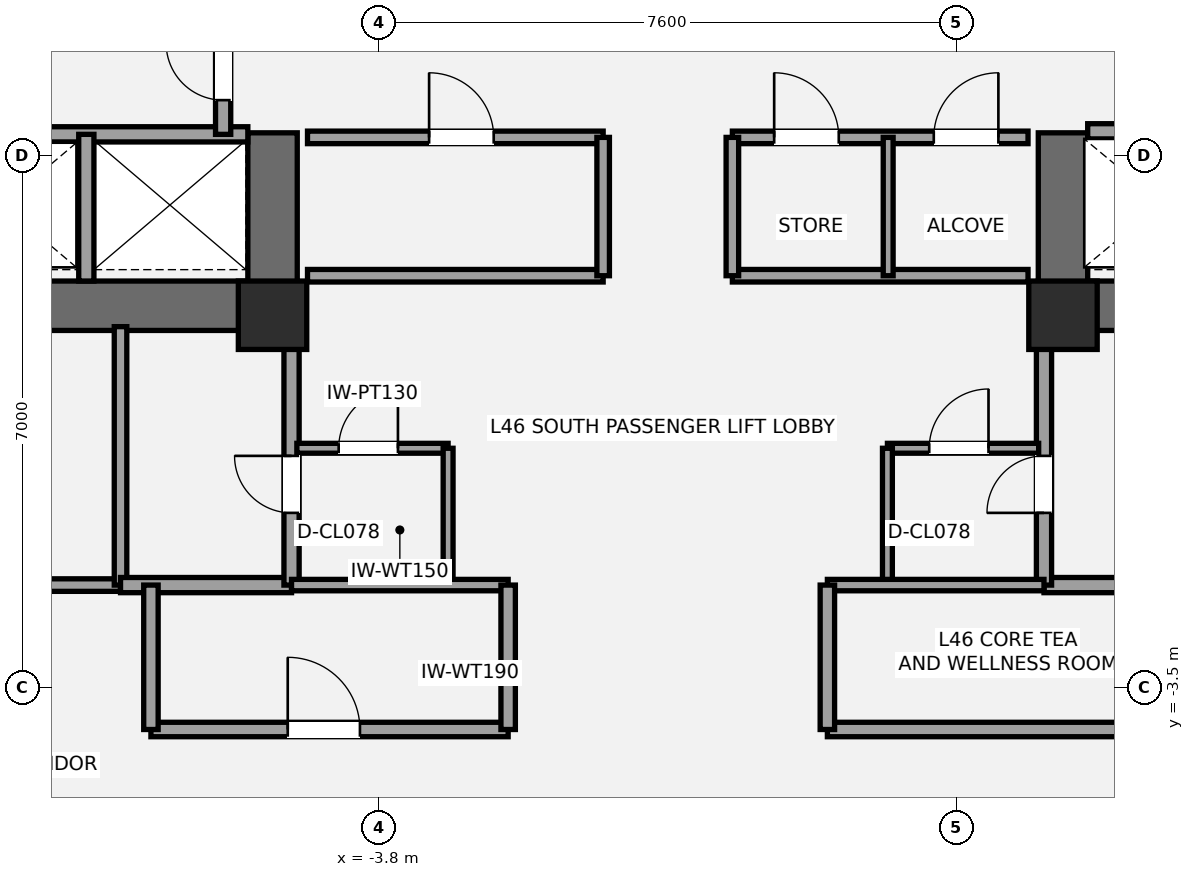
"""IFC4 building model, lengths in metres.
Left out: names, types, materials, properties, quantities, classifications, styles, units other than length and angle.
Written with IfcOpenShell. Run it as: python <this file> out.ifc"""

import sys

from ifc_helpers import new_model, si_unit, direction, frame, frame_2d, origin, origin_2d, place, context, subcontext, project, spatial, rectangle, extrude, element, fill, save


model = new_model("IFC4")
c1 = context("Model", 3, precision=1e-05, world=origin(), true_north=direction((0.0, 1.0)))
c2 = subcontext(c1, "Body", "Model", "MODEL_VIEW")
j1 = project(units=[si_unit("LENGTHUNIT", "METRE"), si_unit("PLANEANGLEUNIT", "RADIAN")], contexts=[c1])
p1 = place(None, origin())
s1 = spatial("IfcSite", under=j1, at=p1, CompositionType="ELEMENT")
p2 = place(p1, origin())
s2 = spatial("IfcBuilding", under=s1, at=p2, CompositionType="ELEMENT")
p3 = place(p2, frame((0.0, 0.0, 169.4)))
s3 = spatial("IfcBuildingStorey", under=s2, at=p3, CompositionType="ELEMENT", Elevation=169.4)
p4 = place(p3, frame((-4.875, 1.525, 0.0), z_axis=(0.0, 0.0, 1.0), x_axis=(-1.0, 0.0, 0.0)))
e1 = element("IfcWall", 1, at=p4, inside=s3, PredefinedType="SHEAR", context=c2, shape_type="SweptSolid", body=[
    extrude(rectangle(XDim=8.925, YDim=0.65, at=frame_2d((4.462, 0.0))), origin(), (0.0, 0.0, 1.0), 3.2),
])
p5 = place(p4, frame((5.425, 0.0, 0.0)))
e2 = element("IfcOpeningElement", 2, at=p5, cuts=e1, PredefinedType="OPENING", context=c2, shape_type="SweptSolid", body=[
    extrude(rectangle(XDim=1.05, YDim=2.15, at=frame_2d((0.525, 1.075))), frame((0.0, 0.335, 0.0), z_axis=(0.0, -1.0, 0.0), x_axis=(1.0, 0.0, 0.0)), (0.0, 0.0, 1.0), 0.67),
])
p6 = place(p4, frame((3.755, 0.0, 0.0)))
e3 = element("IfcOpeningElement", 3, at=p6, cuts=e1, PredefinedType="OPENING", context=c2, shape_type="SweptSolid", body=[
    extrude(rectangle(XDim=1.1, YDim=2.2, at=frame_2d((0.55, 1.1))), frame((0.0, 0.335, 0.0), z_axis=(0.0, -1.0, 0.0), x_axis=(1.0, 0.0, 0.0)), (0.0, 0.0, 1.0), 0.67),
])
p7 = place(p3, frame((-5.2, 1.2, 0.0), z_axis=(0.0, 0.0, 1.0), x_axis=(0.0, 1.0, 0.0)))
e4 = element("IfcWall", 4, at=p7, inside=s3, PredefinedType="SHEAR", context=c2, shape_type="SweptSolid", body=[
    extrude(rectangle(XDim=2.6, YDim=0.65, at=frame_2d((1.3, 0.0))), origin(), (0.0, 0.0, 1.0), 3.2),
])
p8 = place(p3, frame((13.8, 1.525, 0.0), z_axis=(0.0, 0.0, 1.0), x_axis=(-1.0, 0.0, 0.0)))
e5 = element("IfcWall", 5, at=p8, inside=s3, PredefinedType="SHEAR", context=c2, shape_type="SweptSolid", body=[
    extrude(rectangle(XDim=8.925, YDim=0.65, at=frame_2d((4.462, 0.0))), origin(), (0.0, 0.0, 1.0), 3.2),
])
p9 = place(p8, frame((2.45, 0.0, 0.0)))
e6 = element("IfcOpeningElement", 6, at=p9, cuts=e5, PredefinedType="OPENING", context=c2, shape_type="SweptSolid", body=[
    extrude(rectangle(XDim=1.05, YDim=2.15, at=frame_2d((0.525, 1.075))), frame((0.0, 0.335, 0.0), z_axis=(0.0, -1.0, 0.0), x_axis=(1.0, 0.0, 0.0)), (0.0, 0.0, 1.0), 0.67),
])
p10 = place(p8, frame((4.45, 0.0, 0.0)))
e7 = element("IfcOpeningElement", 7, at=p10, cuts=e5, PredefinedType="OPENING", context=c2, shape_type="SweptSolid", body=[
    extrude(rectangle(XDim=1.1, YDim=2.2, at=frame_2d((0.55, 1.1))), frame((0.0, 0.335, 0.0), z_axis=(0.0, -1.0, 0.0), x_axis=(1.0, 0.0, 0.0)), (0.0, 0.0, 1.0), 0.67),
])
p11 = place(p3, frame((5.2, 1.2, 0.0), z_axis=(0.0, 0.0, 1.0), x_axis=(0.0, 1.0, 0.0)))
e8 = element("IfcWall", 8, at=p11, inside=s3, PredefinedType="SHEAR", context=c2, shape_type="SweptSolid", body=[
    extrude(rectangle(XDim=2.6, YDim=0.65, at=frame_2d((1.3, 0.0))), origin(), (0.0, 0.0, 1.0), 3.2),
])
for number, where, z_axis, x_axis in (
    (9, (-5.2, 1.4, 0.0), (0.0, 0.0, 1.0), (1.0, 0.0, 0.0)),
    (10, (5.2, 1.4, 0.0), (0.0, 0.0, 1.0), (1.0, 0.0, 0.0)),
):
    element("IfcColumn", number, at=place(p3, frame(where, z_axis=z_axis, x_axis=x_axis)), inside=s3, PredefinedType="COLUMN", context=c2, shape_type="SweptSolid", body=[
        extrude(rectangle(XDim=0.9, YDim=0.9, at=origin_2d()), origin(), (0.0, 0.0, 1.0), 3.2),
    ])
p12 = place(p3, frame((-13.45, -2.15, 0.0), z_axis=(0.0, 0.0, 1.0), x_axis=(1.0, 0.0, 0.0)))
e11 = element("IfcWall", 11, at=p12, inside=s3, PredefinedType="PARTITIONING", context=c2, shape_type="SweptSolid", body=[
    extrude(rectangle(XDim=6.25, YDim=0.165, at=frame_2d((3.125, 0.0))), origin(), (0.0, 0.0, 1.0), 2.473),
])
p13 = place(p3, frame((-7.2, -2.15, 0.0), z_axis=(0.0, 0.0, 1.0), x_axis=(0.0, 1.0, 0.0)))
e12 = element("IfcWall", 12, at=p13, inside=s3, PredefinedType="PARTITIONING", context=c2, shape_type="SweptSolid", body=[
    extrude(rectangle(XDim=3.4, YDim=0.165, at=frame_2d((1.7, 0.0))), origin(), (0.0, 0.0, 1.0), 2.473),
])
p14 = place(p3, frame((-7.2, -2.15, 0.0), z_axis=(0.0, 0.0, 1.0), x_axis=(1.0, 0.0, 0.0)))
e13 = element("IfcWall", 13, at=p14, inside=s3, PredefinedType="SOLIDWALL", context=c2, shape_type="SweptSolid", body=[
    extrude(rectangle(XDim=2.25, YDim=0.2, at=frame_2d((1.125, 0.0))), origin(), (0.0, 0.0, 1.0), 3.02),
])
p15 = place(p3, frame((-4.95, -2.15, 0.0), z_axis=(0.0, 0.0, 1.0), x_axis=(0.0, 1.0, 0.0)))
e14 = element("IfcWall", 14, at=p15, inside=s3, PredefinedType="SOLIDWALL", context=c2, shape_type="SweptSolid", body=[
    extrude(rectangle(XDim=3.4, YDim=0.2, at=frame_2d((1.7, 0.0))), origin(), (0.0, 0.0, 1.0), 2.473),
])
p16 = place(p15, frame((0.95, 0.0, 0.0)))
e15 = element("IfcOpeningElement", 15, at=p16, cuts=e14, PredefinedType="OPENING", context=c2, shape_type="SweptSolid", body=[
    extrude(rectangle(XDim=0.75, YDim=2.1, at=frame_2d((0.375, 1.05))), frame((0.0, 0.11, 0.0), z_axis=(0.0, -1.0, 0.0), x_axis=(1.0, 0.0, 0.0)), (0.0, 0.0, 1.0), 0.22),
])
p17 = place(p3, frame((4.95, -2.15, 0.0), z_axis=(0.0, 0.0, 1.0), x_axis=(1.0, 0.0, 0.0)))
e16 = element("IfcWall", 16, at=p17, inside=s3, PredefinedType="SOLIDWALL", context=c2, shape_type="SweptSolid", body=[
    extrude(rectangle(XDim=2.25, YDim=0.2, at=frame_2d((1.125, 0.0))), origin(), (0.0, 0.0, 1.0), 3.02),
])
p18 = place(p3, frame((4.95, -2.15, 0.0), z_axis=(0.0, 0.0, 1.0), x_axis=(0.0, 1.0, 0.0)))
e17 = element("IfcWall", 17, at=p18, inside=s3, PredefinedType="SOLIDWALL", context=c2, shape_type="SweptSolid", body=[
    extrude(rectangle(XDim=3.4, YDim=0.2, at=frame_2d((1.7, 0.0))), origin(), (0.0, 0.0, 1.0), 2.473),
])
p19 = place(p18, frame((0.95, 0.0, 0.0)))
e18 = element("IfcOpeningElement", 18, at=p19, cuts=e17, PredefinedType="OPENING", context=c2, shape_type="SweptSolid", body=[
    extrude(rectangle(XDim=0.75, YDim=2.1, at=frame_2d((0.375, 1.05))), frame((0.0, 0.11, 0.0), z_axis=(0.0, -1.0, 0.0), x_axis=(1.0, 0.0, 0.0)), (0.0, 0.0, 1.0), 0.22),
])
p20 = place(p3, frame((-4.88, -0.35, 0.0), z_axis=(0.0, 0.0, 1.0), x_axis=(1.0, 0.0, 0.0)))
e19 = element("IfcWall", 19, at=p20, inside=s3, PredefinedType="PARTITIONING", context=c2, shape_type="SweptSolid", body=[
    extrude(rectangle(XDim=1.99, YDim=0.13, at=frame_2d((0.995, 0.0))), origin(), (0.0, 0.0, 1.0), 3.02),
])
p21 = place(p20, frame((0.55, 0.0, 0.0)))
e20 = element("IfcOpeningElement", 20, at=p21, cuts=e19, PredefinedType="OPENING", context=c2, shape_type="SweptSolid", body=[
    extrude(rectangle(XDim=0.78, YDim=2.1, at=frame_2d((0.39, 1.05))), frame((0.0, 0.075, 0.0), z_axis=(0.0, -1.0, 0.0), x_axis=(1.0, 0.0, 0.0)), (0.0, 0.0, 1.0), 0.15),
])
p22 = place(p3, frame((-2.89, -2.15, 0.0), z_axis=(0.0, 0.0, 1.0), x_axis=(0.0, 1.0, 0.0)))
e21 = element("IfcWall", 21, at=p22, inside=s3, PredefinedType="PARTITIONING", context=c2, shape_type="SweptSolid", body=[
    extrude(rectangle(XDim=1.8, YDim=0.13, at=frame_2d((0.9, 0.0))), origin(), (0.0, 0.0, 1.0), 3.02),
])
p23 = place(p3, frame((2.89, -0.35, 0.0), z_axis=(0.0, 0.0, 1.0), x_axis=(1.0, 0.0, 0.0)))
e22 = element("IfcWall", 22, at=p23, inside=s3, PredefinedType="PARTITIONING", context=c2, shape_type="SweptSolid", body=[
    extrude(rectangle(XDim=1.99, YDim=0.13, at=frame_2d((0.995, 0.0))), origin(), (0.0, 0.0, 1.0), 3.02),
])
p24 = place(p23, frame((0.55, 0.0, 0.0)))
e23 = element("IfcOpeningElement", 23, at=p24, cuts=e22, PredefinedType="OPENING", context=c2, shape_type="SweptSolid", body=[
    extrude(rectangle(XDim=0.78, YDim=2.1, at=frame_2d((0.39, 1.05))), frame((0.0, 0.075, 0.0), z_axis=(0.0, -1.0, 0.0), x_axis=(1.0, 0.0, 0.0)), (0.0, 0.0, 1.0), 0.15),
])
p25 = place(p3, frame((2.89, -2.15, 0.0), z_axis=(0.0, 0.0, 1.0), x_axis=(0.0, 1.0, 0.0)))
e24 = element("IfcWall", 24, at=p25, inside=s3, PredefinedType="PARTITIONING", context=c2, shape_type="SweptSolid", body=[
    extrude(rectangle(XDim=1.8, YDim=0.13, at=frame_2d((0.9, 0.0))), origin(), (0.0, 0.0, 1.0), 3.02),
])
p26 = place(p3, frame((-9.78, 3.78, 0.0), z_axis=(0.0, 0.0, 1.0), x_axis=(1.0, 0.0, 0.0)))
e25 = element("IfcWall", 25, at=p26, inside=s3, PredefinedType="SOLIDWALL", context=c2, shape_type="SweptSolid", body=[
    extrude(rectangle(XDim=4.255, YDim=0.2, at=frame_2d((2.127, 0.0))), origin(), (0.0, 0.0, 1.0), 3.02),
])
p27 = place(p3, frame((-7.65, 1.85, 0.0), z_axis=(0.0, 0.0, 1.0), x_axis=(0.0, 1.0, 0.0)))
e26 = element("IfcWall", 26, at=p27, inside=s3, PredefinedType="SOLIDWALL", context=c2, shape_type="SweptSolid", body=[
    extrude(rectangle(XDim=1.93, YDim=0.2, at=frame_2d((0.965, 0.0))), origin(), (0.0, 0.0, 1.0), 3.02),
])
p28 = place(p3, frame((-5.85, 3.78, 0.0), z_axis=(0.0, 0.0, 1.0), x_axis=(0.0, 1.0, 0.0)))
e27 = element("IfcWall", 27, at=p28, inside=s3, PredefinedType="SOLIDWALL", context=c2, shape_type="SweptSolid", body=[
    extrude(rectangle(XDim=1.69, YDim=0.2, at=frame_2d((0.845, 0.0))), origin(), (0.0, 0.0, 1.0), 3.02),
])
p29 = place(p28, frame((0.45, 0.0, 0.0)))
e28 = element("IfcOpeningElement", 28, at=p29, cuts=e27, PredefinedType="OPENING", context=c2, shape_type="SweptSolid", body=[
    extrude(rectangle(XDim=0.75, YDim=2.1, at=frame_2d((0.375, 1.05))), frame((0.0, 0.11, 0.0), z_axis=(0.0, -1.0, 0.0), x_axis=(1.0, 0.0, 0.0)), (0.0, 0.0, 1.0), 0.22),
])
p30 = place(p3, frame((5.525, 3.82, 0.0), z_axis=(0.0, 0.0, 1.0), x_axis=(1.0, 0.0, 0.0)))
e29 = element("IfcWall", 29, at=p30, inside=s3, PredefinedType="SOLIDWALL", context=c2, shape_type="SweptSolid", body=[
    extrude(rectangle(XDim=4.255, YDim=0.2, at=frame_2d((2.127, 0.0))), origin(), (0.0, 0.0, 1.0), 3.02),
])
p31 = place(p30, frame((0.65, 0.0, 0.0)))
e30 = element("IfcOpeningElement", 30, at=p31, cuts=e29, PredefinedType="OPENING", context=c2, shape_type="SweptSolid", body=[
    extrude(rectangle(XDim=1.2, YDim=2.2, at=frame_2d((0.6, 1.1))), frame((0.0, 0.11, 0.0), z_axis=(0.0, -1.0, 0.0), x_axis=(1.0, 0.0, 0.0)), (0.0, 0.0, 1.0), 0.22),
])
p32 = place(p3, frame((-4.74, 1.92, 0.0), z_axis=(0.0, 0.0, 1.0), x_axis=(1.0, 0.0, 0.0)))
e31 = element("IfcWall", 31, at=p32, inside=s3, PredefinedType="PARTITIONING", context=c2, shape_type="SweptSolid", body=[
    extrude(rectangle(XDim=3.89, YDim=0.165, at=frame_2d((1.945, 0.0))), origin(), (0.0, 0.0, 1.0), 2.16),
])
p33 = place(p3, frame((-4.74, 3.74, 0.0), z_axis=(0.0, 0.0, 1.0), x_axis=(1.0, 0.0, 0.0)))
e32 = element("IfcWall", 32, at=p33, inside=s3, PredefinedType="PARTITIONING", context=c2, shape_type="SweptSolid", body=[
    extrude(rectangle(XDim=3.89, YDim=0.165, at=frame_2d((1.945, 0.0))), origin(), (0.0, 0.0, 1.0), 3.02),
])
p34 = place(p33, frame((1.6, 0.0, 0.0)))
e33 = element("IfcOpeningElement", 33, at=p34, cuts=e32, PredefinedType="OPENING", context=c2, shape_type="SweptSolid", body=[
    extrude(rectangle(XDim=0.85, YDim=2.1, at=frame_2d((0.425, 1.05))), frame((0.0, 0.093, 0.0), z_axis=(0.0, -1.0, 0.0), x_axis=(1.0, 0.0, 0.0)), (0.0, 0.0, 1.0), 0.185),
])
p35 = place(p3, frame((-0.85, 1.92, 0.0), z_axis=(0.0, 0.0, 1.0), x_axis=(0.0, 1.0, 0.0)))
e34 = element("IfcWall", 34, at=p35, inside=s3, PredefinedType="PARTITIONING", context=c2, shape_type="SweptSolid", body=[
    extrude(rectangle(XDim=1.82, YDim=0.165, at=frame_2d((0.91, 0.0))), origin(), (0.0, 0.0, 1.0), 3.02),
])
p36 = place(p3, frame((0.85, 1.92, 0.0), z_axis=(0.0, 0.0, 1.0), x_axis=(1.0, 0.0, 0.0)))
e35 = element("IfcWall", 35, at=p36, inside=s3, PredefinedType="PARTITIONING", context=c2, shape_type="SweptSolid", body=[
    extrude(rectangle(XDim=3.89, YDim=0.165, at=frame_2d((1.945, 0.0))), origin(), (0.0, 0.0, 1.0), 2.16),
])
p37 = place(p3, frame((0.85, 3.74, 0.0), z_axis=(0.0, 0.0, 1.0), x_axis=(1.0, 0.0, 0.0)))
e36 = element("IfcWall", 36, at=p37, inside=s3, PredefinedType="PARTITIONING", context=c2, shape_type="SweptSolid", body=[
    extrude(rectangle(XDim=3.89, YDim=0.165, at=frame_2d((1.945, 0.0))), origin(), (0.0, 0.0, 1.0), 3.02),
])
p38 = place(p37, frame((0.55, 0.0, 0.0)))
e37 = element("IfcOpeningElement", 37, at=p38, cuts=e36, PredefinedType="OPENING", context=c2, shape_type="SweptSolid", body=[
    extrude(rectangle(XDim=0.85, YDim=2.1, at=frame_2d((0.425, 1.05))), frame((0.0, 0.093, 0.0), z_axis=(0.0, -1.0, 0.0), x_axis=(1.0, 0.0, 0.0)), (0.0, 0.0, 1.0), 0.185),
])
p39 = place(p37, frame((2.65, 0.0, 0.0)))
e38 = element("IfcOpeningElement", 38, at=p39, cuts=e36, PredefinedType="OPENING", context=c2, shape_type="SweptSolid", body=[
    extrude(rectangle(XDim=0.85, YDim=2.1, at=frame_2d((0.425, 1.05))), frame((0.0, 0.093, 0.0), z_axis=(0.0, -1.0, 0.0), x_axis=(1.0, 0.0, 0.0)), (0.0, 0.0, 1.0), 0.185),
])
p40 = place(p3, frame((0.85, 1.92, 0.0), z_axis=(0.0, 0.0, 1.0), x_axis=(0.0, 1.0, 0.0)))
e39 = element("IfcWall", 39, at=p40, inside=s3, PredefinedType="PARTITIONING", context=c2, shape_type="SweptSolid", body=[
    extrude(rectangle(XDim=1.82, YDim=0.165, at=frame_2d((0.91, 0.0))), origin(), (0.0, 0.0, 1.0), 3.02),
])
p41 = place(p3, frame((2.9, 1.92, 0.0), z_axis=(0.0, 0.0, 1.0), x_axis=(0.0, 1.0, 0.0)))
e40 = element("IfcWall", 40, at=p41, inside=s3, PredefinedType="PARTITIONING", context=c2, shape_type="SweptSolid", body=[
    extrude(rectangle(XDim=1.82, YDim=0.13, at=frame_2d((0.91, 0.0))), origin(), (0.0, 0.0, 1.0), 3.02),
])
p42 = place(p3, frame((-6.8, -4.05, 0.0), z_axis=(0.0, 0.0, 1.0), x_axis=(1.0, 0.0, 0.0)))
e41 = element("IfcWall", 41, at=p42, inside=s3, PredefinedType="PLUMBINGWALL", context=c2, shape_type="SweptSolid", body=[
    extrude(rectangle(XDim=4.7, YDim=0.19, at=frame_2d((2.35, 0.0))), origin(), (0.0, 0.0, 1.0), 3.02),
])
p43 = place(p42, frame((1.8, 0.0, 0.0)))
e42 = element("IfcOpeningElement", 42, at=p43, cuts=e41, PredefinedType="OPENING", context=c2, shape_type="SweptSolid", body=[
    extrude(rectangle(XDim=0.95, YDim=2.15, at=frame_2d((0.475, 1.075))), frame((0.0, 0.105, 0.0), z_axis=(0.0, -1.0, 0.0), x_axis=(1.0, 0.0, 0.0)), (0.0, 0.0, 1.0), 0.21),
])
p44 = place(p3, frame((-4.95, -2.15, 0.0), z_axis=(0.0, 0.0, 1.0), x_axis=(1.0, 0.0, 0.0)))
e43 = element("IfcWall", 43, at=p44, inside=s3, PredefinedType="PLUMBINGWALL", context=c2, shape_type="SweptSolid", body=[
    extrude(rectangle(XDim=2.85, YDim=0.15, at=frame_2d((1.425, 0.0))), origin(), (0.0, 0.0, 1.0), 3.02),
])
p45 = place(p3, frame((-6.8, -4.05, 0.0), z_axis=(0.0, 0.0, 1.0), x_axis=(0.0, 1.0, 0.0)))
e44 = element("IfcWall", 44, at=p45, inside=s3, PredefinedType="PLUMBINGWALL", context=c2, shape_type="SweptSolid", body=[
    extrude(rectangle(XDim=1.9, YDim=0.19, at=frame_2d((0.95, 0.0))), origin(), (0.0, 0.0, 1.0), 2.473),
])
p46 = place(p3, frame((-2.1, -4.05, 0.0), z_axis=(0.0, 0.0, 1.0), x_axis=(0.0, 1.0, 0.0)))
e45 = element("IfcWall", 45, at=p46, inside=s3, PredefinedType="PLUMBINGWALL", context=c2, shape_type="SweptSolid", body=[
    extrude(rectangle(XDim=1.9, YDim=0.19, at=frame_2d((0.95, 0.0))), origin(), (0.0, 0.0, 1.0), 3.02),
])
p47 = place(p3, frame((2.1, -4.05, 0.0), z_axis=(0.0, 0.0, 1.0), x_axis=(1.0, 0.0, 0.0)))
e46 = element("IfcWall", 46, at=p47, inside=s3, PredefinedType="PLUMBINGWALL", context=c2, shape_type="SweptSolid", body=[
    extrude(rectangle(XDim=11.35, YDim=0.19, at=frame_2d((5.675, 0.0))), origin(), (0.0, 0.0, 1.0), 3.02),
])
p48 = place(p47, frame((5.2, 0.0, 0.0)))
e47 = element("IfcOpeningElement", 47, at=p48, cuts=e46, PredefinedType="OPENING", context=c2, shape_type="SweptSolid", body=[
    extrude(rectangle(XDim=0.9, YDim=2.1, at=frame_2d((0.45, 1.05))), frame((0.0, 0.105, 0.0), z_axis=(0.0, -1.0, 0.0), x_axis=(1.0, 0.0, 0.0)), (0.0, 0.0, 1.0), 0.21),
])
p49 = place(p3, frame((2.1, -2.15, 0.0), z_axis=(0.0, 0.0, 1.0), x_axis=(1.0, 0.0, 0.0)))
e48 = element("IfcWall", 48, at=p49, inside=s3, PredefinedType="PLUMBINGWALL", context=c2, shape_type="SweptSolid", body=[
    extrude(rectangle(XDim=2.85, YDim=0.15, at=frame_2d((1.425, 0.0))), origin(), (0.0, 0.0, 1.0), 3.02),
])
p50 = place(p3, frame((2.1, -4.05, 0.0), z_axis=(0.0, 0.0, 1.0), x_axis=(0.0, 1.0, 0.0)))
e49 = element("IfcWall", 49, at=p50, inside=s3, PredefinedType="PLUMBINGWALL", context=c2, shape_type="SweptSolid", body=[
    extrude(rectangle(XDim=1.9, YDim=0.19, at=frame_2d((0.95, 0.0))), origin(), (0.0, 0.0, 1.0), 3.02),
])
p51 = place(p16, origin())
e50 = element("IfcDoor", 50, at=p51, inside=s3, OperationType="SINGLE_SWING_RIGHT", PredefinedType="DOOR", context=c2, shape_type="SweptSolid", body=[
    extrude(rectangle(XDim=0.75, YDim=2.1, at=frame_2d((0.375, 1.05))), frame((0.0, 0.025, 0.0), z_axis=(0.0, -1.0, 0.0), x_axis=(1.0, 0.0, 0.0)), (0.0, 0.0, 1.0), 0.05),
])
fill(e15, e50)
p52 = place(p19, origin())
e51 = element("IfcDoor", 51, at=p52, inside=s3, OperationType="SINGLE_SWING_LEFT", PredefinedType="DOOR", context=c2, shape_type="SweptSolid", body=[
    extrude(rectangle(XDim=0.75, YDim=2.1, at=frame_2d((0.375, 1.05))), frame((0.0, 0.025, 0.0), z_axis=(0.0, -1.0, 0.0), x_axis=(1.0, 0.0, 0.0)), (0.0, 0.0, 1.0), 0.05),
])
fill(e18, e51)
p53 = place(p21, origin())
e52 = element("IfcDoor", 52, at=p53, inside=s3, OperationType="SINGLE_SWING_RIGHT", PredefinedType="DOOR", context=c2, shape_type="SweptSolid", body=[
    extrude(rectangle(XDim=0.78, YDim=2.1, at=frame_2d((0.39, 1.05))), frame((0.0, 0.025, 0.0), z_axis=(0.0, -1.0, 0.0), x_axis=(1.0, 0.0, 0.0)), (0.0, 0.0, 1.0), 0.05),
])
fill(e20, e52)
p54 = place(p24, origin())
e53 = element("IfcDoor", 53, at=p54, inside=s3, OperationType="SINGLE_SWING_RIGHT", PredefinedType="DOOR", context=c2, shape_type="SweptSolid", body=[
    extrude(rectangle(XDim=0.78, YDim=2.1, at=frame_2d((0.39, 1.05))), frame((0.0, 0.025, 0.0), z_axis=(0.0, -1.0, 0.0), x_axis=(1.0, 0.0, 0.0)), (0.0, 0.0, 1.0), 0.05),
])
fill(e23, e53)
p55 = place(p29, origin())
e54 = element("IfcDoor", 54, at=p55, inside=s3, OperationType="SINGLE_SWING_RIGHT", PredefinedType="DOOR", context=c2, shape_type="SweptSolid", body=[
    extrude(rectangle(XDim=0.75, YDim=2.1, at=frame_2d((0.375, 1.05))), frame((0.0, 0.025, 0.0), z_axis=(0.0, -1.0, 0.0), x_axis=(1.0, 0.0, 0.0)), (0.0, 0.0, 1.0), 0.05),
])
fill(e28, e54)
p56 = place(p34, origin())
e55 = element("IfcDoor", 55, at=p56, inside=s3, OperationType="SINGLE_SWING_LEFT", PredefinedType="DOOR", context=c2, shape_type="SweptSolid", body=[
    extrude(rectangle(XDim=0.85, YDim=2.1, at=frame_2d((0.425, 1.05))), frame((0.0, 0.025, 0.0), z_axis=(0.0, -1.0, 0.0), x_axis=(1.0, 0.0, 0.0)), (0.0, 0.0, 1.0), 0.05),
])
fill(e33, e55)
p57 = place(p38, origin())
e56 = element("IfcDoor", 56, at=p57, inside=s3, OperationType="SINGLE_SWING_LEFT", PredefinedType="DOOR", context=c2, shape_type="SweptSolid", body=[
    extrude(rectangle(XDim=0.85, YDim=2.1, at=frame_2d((0.425, 1.05))), frame((0.0, 0.025, 0.0), z_axis=(0.0, -1.0, 0.0), x_axis=(1.0, 0.0, 0.0)), (0.0, 0.0, 1.0), 0.05),
])
fill(e37, e56)
p58 = place(p39, origin())
e57 = element("IfcDoor", 57, at=p58, inside=s3, OperationType="SINGLE_SWING_RIGHT", PredefinedType="DOOR", context=c2, shape_type="SweptSolid", body=[
    extrude(rectangle(XDim=0.85, YDim=2.1, at=frame_2d((0.425, 1.05))), frame((0.0, 0.025, 0.0), z_axis=(0.0, -1.0, 0.0), x_axis=(1.0, 0.0, 0.0)), (0.0, 0.0, 1.0), 0.05),
])
fill(e38, e57)
p59 = place(p43, origin())
e58 = element("IfcDoor", 58, at=p59, inside=s3, OperationType="SINGLE_SWING_LEFT", PredefinedType="DOOR", context=c2, shape_type="SweptSolid", body=[
    extrude(rectangle(XDim=0.95, YDim=2.15, at=frame_2d((0.475, 1.075))), frame((0.0, 0.025, 0.0), z_axis=(0.0, -1.0, 0.0), x_axis=(1.0, 0.0, 0.0)), (0.0, 0.0, 1.0), 0.05),
])
fill(e42, e58)
save(model, sys.argv[1])
